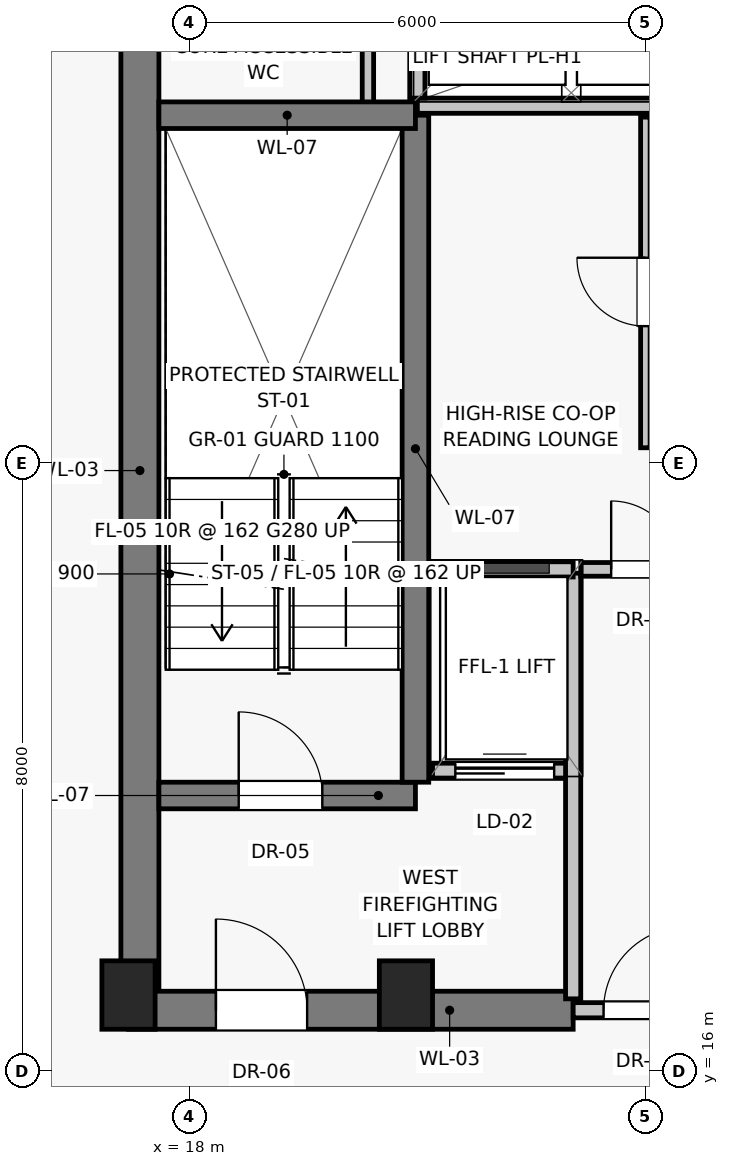
"""IFC4 building model, lengths in metres.
Left out: names, types, materials, properties, quantities, classifications, styles, units other than length and angle.
Written with IfcOpenShell. Run it as: python <this file> out.ifc"""

import sys

from ifc_helpers import new_model, si_unit, direction, frame, frame_2d, origin, origin_2d, place, context, subcontext, project, spatial, rectangle, extrude, source, transform, mapped, element, fill, save


model = new_model("IFC4")
c1 = context("Model", 3, precision=1e-05, world=origin(), true_north=direction((0.0, 1.0)))
c2 = subcontext(c1, "Body", "Model", "MODEL_VIEW")
j1 = project(units=[si_unit("LENGTHUNIT", "METRE"), si_unit("PLANEANGLEUNIT", "RADIAN")], contexts=[c1])
p1 = place(None, origin())
s1 = spatial("IfcSite", under=j1, at=p1, CompositionType="ELEMENT")
p2 = place(p1, origin())
s2 = spatial("IfcBuilding", under=s1, at=p2, CompositionType="ELEMENT")
p3 = place(p2, frame((0.0, 0.0, 222.15)))
s3 = spatial("IfcBuildingStorey", under=s2, at=p3, CompositionType="ELEMENT", Elevation=222.15)
for number, where, z_axis, x_axis in (
    (1, (17.2, 17.0, 0.0), (0.0, 0.0, 1.0), (1.0, 0.0, 0.0)),
    (2, (20.85, 17.0, 0.0), (0.0, 0.0, 1.0), (1.0, 0.0, 0.0)),
):
    element("IfcColumn", number, at=place(p3, frame(where, z_axis=z_axis, x_axis=x_axis)), inside=s3, PredefinedType="PILASTER", context=c2, shape_type="SweptSolid", body=[
        extrude(rectangle(XDim=0.7, YDim=0.9, at=origin_2d()), origin(), (0.0, 0.0, 1.0), 3.25),
    ])
p4 = place(p3, frame((17.35, 16.8, 0.0), z_axis=(0.0, 0.0, 1.0), x_axis=(0.0, 1.0, 0.0)))
e3 = element("IfcWall", 3, at=p4, inside=s3, PredefinedType="SHEAR", context=c2, shape_type="SweptSolid", body=[
    extrude(rectangle(XDim=14.2, YDim=0.5, at=frame_2d((7.1, 0.0))), origin(), (0.0, 0.0, 1.0), 2.93),
])
p5 = place(p3, frame((17.2, 16.8, 0.0), z_axis=(0.0, 0.0, 1.0), x_axis=(1.0, 0.0, 0.0)))
e4 = element("IfcWall", 4, at=p5, inside=s3, PredefinedType="SHEAR", context=c2, shape_type="SweptSolid", body=[
    extrude(rectangle(XDim=5.85, YDim=0.5, at=frame_2d((2.925, 0.0))), origin(), (0.0, 0.0, 1.0), 2.93),
])
p6 = place(p5, frame((1.15, 0.0, 0.0)))
e5 = element("IfcOpeningElement", 5, at=p6, cuts=e4, PredefinedType="OPENING", context=c2, shape_type="SweptSolid", body=[
    extrude(rectangle(XDim=1.2, YDim=2.03, at=frame_2d((0.6, 1.015))), frame((0.0, 0.26, 0.0), z_axis=(0.0, -1.0, 0.0), x_axis=(1.0, 0.0, 0.0)), (0.0, 0.0, 1.0), 0.52),
])
p7 = place(p3, frame((23.05, 16.8, 0.0), z_axis=(0.0, 0.0, 1.0), x_axis=(1.0, 0.0, 0.0)))
e6 = element("IfcWall", 6, at=p7, inside=s3, PredefinedType="SOLIDWALL", context=c2, shape_type="SweptSolid", body=[
    extrude(rectangle(XDim=1.9, YDim=0.2, at=frame_2d((0.95, 0.0))), origin(), (0.0, 0.0, 1.0), 2.08),
])
p8 = place(p7, frame((0.4, 0.0, 0.0)))
e7 = element("IfcOpeningElement", 7, at=p8, cuts=e6, PredefinedType="OPENING", context=c2, shape_type="SweptSolid", body=[
    extrude(rectangle(XDim=1.1, YDim=2.03, at=frame_2d((0.55, 1.015))), frame((0.0, 0.11, 0.0), z_axis=(0.0, -1.0, 0.0), x_axis=(1.0, 0.0, 0.0)), (0.0, 0.0, 1.0), 0.22),
])
p9 = place(p3, frame((20.35, 28.65, 0.0), z_axis=(0.0, 0.0, 1.0), x_axis=(0.0, 1.0, 0.0)))
e8 = element("IfcWall", 8, at=p9, inside=s3, PredefinedType="PARTITIONING", context=c2, shape_type="SweptSolid", body=[
    extrude(rectangle(XDim=2.2, YDim=0.15, at=frame_2d((1.1, 0.0))), origin(), (0.0, 0.0, 1.0), 2.93),
])
p10 = place(p3, frame((17.6, 19.625, 0.0), z_axis=(0.0, 0.0, 1.0), x_axis=(1.0, 0.0, 0.0)))
e9 = element("IfcWall", 9, at=p10, inside=s3, PredefinedType="SHEAR", context=c2, shape_type="SweptSolid", body=[
    extrude(rectangle(XDim=3.375, YDim=0.35, at=frame_2d((1.688, 0.0))), origin(), (0.0, 0.0, 1.0), 2.93),
])
p11 = place(p10, frame((1.05, 0.0, 0.0)))
e10 = element("IfcOpeningElement", 10, at=p11, cuts=e9, PredefinedType="OPENING", context=c2, shape_type="SweptSolid", body=[
    extrude(rectangle(XDim=1.1, YDim=2.03, at=frame_2d((0.55, 1.015))), frame((0.0, 0.185, 0.0), z_axis=(0.0, -1.0, 0.0), x_axis=(1.0, 0.0, 0.0)), (0.0, 0.0, 1.0), 0.37),
])
p12 = place(p3, frame((21.2, 19.95, 0.0), z_axis=(0.0, 0.0, 1.0), x_axis=(1.0, 0.0, 0.0)))
e11 = element("IfcWall", 11, at=p12, inside=s3, PredefinedType="SOLIDWALL", context=c2, shape_type="SweptSolid", body=[
    extrude(rectangle(XDim=1.85, YDim=0.2, at=frame_2d((0.925, 0.0))), origin(), (0.0, 0.0, 1.0), 2.93),
])
p13 = place(p12, frame((0.3, 0.0, 0.0)))
e12 = element("IfcOpeningElement", 12, at=p13, cuts=e11, PredefinedType="OPENING", context=c2, shape_type="SweptSolid", body=[
    extrude(rectangle(XDim=1.3, YDim=2.25, at=frame_2d((0.65, 1.125))), frame((0.0, 0.11, 0.0), z_axis=(0.0, -1.0, 0.0), x_axis=(1.0, 0.0, 0.0)), (0.0, 0.0, 1.0), 0.22),
])
p14 = place(p3, frame((20.975, 19.8, 0.0), z_axis=(0.0, 0.0, 1.0), x_axis=(0.0, 1.0, 0.0)))
e13 = element("IfcWall", 13, at=p14, inside=s3, PredefinedType="SHEAR", context=c2, shape_type="SweptSolid", body=[
    extrude(rectangle(XDim=8.775, YDim=0.35, at=frame_2d((4.387, 0.0))), origin(), (0.0, 0.0, 1.0), 2.93),
])
p15 = place(p3, frame((17.6, 28.575, 0.0), z_axis=(0.0, 0.0, 1.0), x_axis=(1.0, 0.0, 0.0)))
e14 = element("IfcWall", 14, at=p15, inside=s3, PredefinedType="SHEAR", context=c2, shape_type="SweptSolid", body=[
    extrude(rectangle(XDim=3.375, YDim=0.35, at=frame_2d((1.688, 0.0))), origin(), (0.0, 0.0, 1.0), 2.93),
])
p16 = place(p3, frame((23.05, 16.95, 0.0), z_axis=(0.0, 0.0, 1.0), x_axis=(0.0, 1.0, 0.0)))
e15 = element("IfcWall", 15, at=p16, inside=s3, PredefinedType="SOLIDWALL", context=c2, shape_type="SweptSolid", body=[
    extrude(rectangle(XDim=5.6, YDim=0.2, at=frame_2d((2.8, 0.0))), origin(), (0.0, 0.0, 1.0), 2.93),
])
p17 = place(p3, frame((21.2, 22.6, 0.0), z_axis=(0.0, 0.0, 1.0), x_axis=(1.0, 0.0, 0.0)))
e16 = element("IfcWall", 16, at=p17, inside=s3, PredefinedType="SOLIDWALL", context=c2, shape_type="SweptSolid", body=[
    extrude(rectangle(XDim=1.85, YDim=0.2, at=frame_2d((0.925, 0.0))), origin(), (0.0, 0.0, 1.0), 2.93),
])
p18 = place(p3, frame((21.0, 28.7, 0.0), z_axis=(0.0, 0.0, 1.0), x_axis=(1.0, 0.0, 0.0)))
e17 = element("IfcWall", 17, at=p18, inside=s3, PredefinedType="SOLIDWALL", context=c2, shape_type="SweptSolid", body=[
    extrude(rectangle(XDim=6.0, YDim=0.2, at=frame_2d((3.0, 0.0))), origin(), (0.0, 0.0, 1.0), 2.93),
])
p19 = place(p3, frame((21.0, 28.8, 0.0), z_axis=(0.0, 0.0, 1.0), x_axis=(0.0, 1.0, 0.0)))
e18 = element("IfcWall", 18, at=p19, inside=s3, PredefinedType="SOLIDWALL", context=c2, shape_type="SweptSolid", body=[
    extrude(rectangle(XDim=1.6, YDim=0.2, at=frame_2d((0.8, 0.0))), origin(), (0.0, 0.0, 1.0), 2.93),
])
p20 = place(p3, frame((23.15, 22.6, 0.0), z_axis=(0.0, 0.0, 1.0), x_axis=(1.0, 0.0, 0.0)))
e19 = element("IfcWall", 19, at=p20, inside=s3, PredefinedType="PARTITIONING", context=c2, shape_type="SweptSolid", body=[
    extrude(rectangle(XDim=1.7, YDim=0.18, at=frame_2d((0.85, 0.0))), origin(), (0.0, 0.0, 1.0), 2.93),
])
p21 = place(p20, frame((0.4, 0.0, 0.0)))
e20 = element("IfcOpeningElement", 20, at=p21, cuts=e19, PredefinedType="OPENING", context=c2, shape_type="SweptSolid", body=[
    extrude(rectangle(XDim=0.9, YDim=2.01, at=frame_2d((0.45, 1.005))), frame((0.0, 0.1, 0.0), z_axis=(0.0, -1.0, 0.0), x_axis=(1.0, 0.0, 0.0)), (0.0, 0.0, 1.0), 0.2),
])
p22 = place(p3, frame((24.0, 24.2, 0.0), z_axis=(0.0, 0.0, 1.0), x_axis=(0.0, 1.0, 0.0)))
e21 = element("IfcWall", 21, at=p22, inside=s3, PredefinedType="PARTITIONING", context=c2, shape_type="SweptSolid", body=[
    extrude(rectangle(XDim=4.35, YDim=0.125, at=frame_2d((2.175, 0.0))), origin(), (0.0, 0.0, 1.0), 2.93),
])
p23 = place(p22, frame((1.6, 0.0, 0.0)))
e22 = element("IfcOpeningElement", 22, at=p23, cuts=e21, PredefinedType="OPENING", context=c2, shape_type="SweptSolid", body=[
    extrude(rectangle(XDim=0.9, YDim=2.01, at=frame_2d((0.45, 1.005))), frame((0.0, 0.073, 0.0), z_axis=(0.0, -1.0, 0.0), x_axis=(1.0, 0.0, 0.0)), (0.0, 0.0, 1.0), 0.145),
])
m1 = source(origin(), c2, "Body", "SweptSolid", [
    extrude(rectangle(XDim=1.2, YDim=2.03, at=frame_2d((0.6, 1.015))), frame((0.0, 0.025, 0.0), z_axis=(0.0, -1.0, 0.0), x_axis=(1.0, 0.0, 0.0)), (0.0, 0.0, 1.0), 0.05),
])
p24 = place(p6, origin())
e23 = element("IfcDoor", 23, at=p24, inside=s3, OperationType="SINGLE_SWING_LEFT", PredefinedType="DOOR", context=c2, shape_type="MappedRepresentation", body=[
    mapped(m1, transform((0.0, 0.0, 0.0), scale=1.0)),
])
fill(e5, e23)
m2 = source(origin(), c2, "Body", "SweptSolid", [
    extrude(rectangle(XDim=1.1, YDim=2.03, at=frame_2d((0.55, 1.015))), frame((0.0, 0.025, 0.0), z_axis=(0.0, -1.0, 0.0), x_axis=(1.0, 0.0, 0.0)), (0.0, 0.0, 1.0), 0.05),
])
p25 = place(p8, origin())
e24 = element("IfcDoor", 24, at=p25, inside=s3, OperationType="SINGLE_SWING_RIGHT", PredefinedType="DOOR", context=c2, shape_type="MappedRepresentation", body=[
    mapped(m2, transform((0.0, 0.0, 0.0), scale=1.0)),
])
fill(e7, e24)
p26 = place(p11, origin())
e25 = element("IfcDoor", 25, at=p26, inside=s3, OperationType="SINGLE_SWING_LEFT", PredefinedType="DOOR", context=c2, shape_type="MappedRepresentation", body=[
    mapped(m2, transform((0.0, 0.0, 0.0), scale=1.0)),
])
fill(e10, e25)
m3 = source(origin(), c2, "Body", "SweptSolid", [
    extrude(rectangle(XDim=1.3, YDim=2.25, at=frame_2d((0.65, 1.125))), frame((0.0, 0.025, 0.0), z_axis=(0.0, -1.0, 0.0), x_axis=(1.0, 0.0, 0.0)), (0.0, 0.0, 1.0), 0.05),
])
p27 = place(p13, origin())
e26 = element("IfcDoor", 26, at=p27, inside=s3, OperationType="SLIDING_TO_LEFT", PredefinedType="DOOR", context=c2, shape_type="MappedRepresentation", body=[
    mapped(m3, transform((0.0, 0.0, 0.0), scale=1.0)),
])
fill(e12, e26)
m4 = source(origin(), c2, "Body", "SweptSolid", [
    extrude(rectangle(XDim=0.9, YDim=2.01, at=frame_2d((0.45, 1.005))), frame((0.0, 0.025, 0.0), z_axis=(0.0, -1.0, 0.0), x_axis=(1.0, 0.0, 0.0)), (0.0, 0.0, 1.0), 0.05),
])
p28 = place(p21, origin())
e27 = element("IfcDoor", 27, at=p28, inside=s3, OperationType="SINGLE_SWING_LEFT", PredefinedType="DOOR", context=c2, shape_type="MappedRepresentation", body=[
    mapped(m4, transform((0.0, 0.0, 0.0), scale=1.0)),
])
fill(e20, e27)
p29 = place(p23, origin())
e28 = element("IfcDoor", 28, at=p29, inside=s3, OperationType="SINGLE_SWING_RIGHT", PredefinedType="DOOR", context=c2, shape_type="MappedRepresentation", body=[
    mapped(m4, transform((0.0, 0.0, 0.0), scale=1.0)),
])
fill(e22, e28)
save(model, sys.argv[1])
